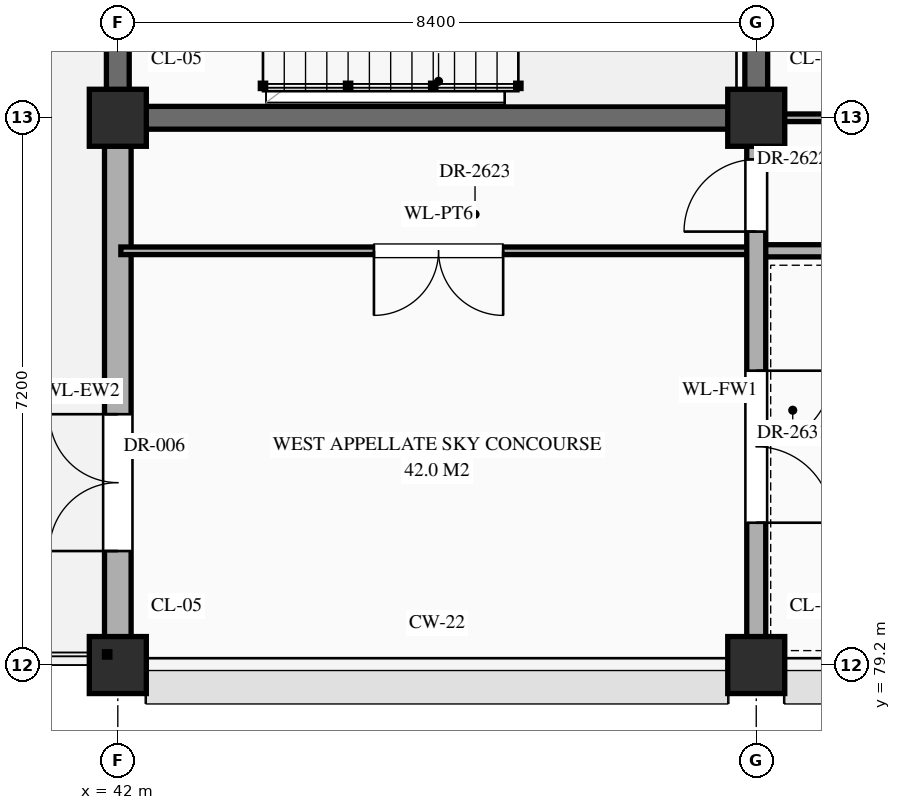
"""IFC4 building model, lengths in metres.
Left out: names, types, materials, properties, quantities, classifications, styles, units other than length and angle.
Written with IfcOpenShell. Run it as: python <this file> out.ifc"""

import sys

from ifc_helpers import new_model, si_unit, direction, frame, frame_2d, origin, origin_2d, place, context, subcontext, project, spatial, rectangle, extrude, element, fill, save


model = new_model("IFC4")
c1 = context("Model", 3, precision=1e-05, world=origin(), true_north=direction((0.0, 1.0)))
c2 = subcontext(c1, "Body", "Model", "MODEL_VIEW")
j1 = project(units=[si_unit("LENGTHUNIT", "METRE"), si_unit("PLANEANGLEUNIT", "RADIAN")], contexts=[c1])
p1 = place(None, origin())
s1 = spatial("IfcSite", under=j1, at=p1, CompositionType="ELEMENT")
p2 = place(p1, origin())
s2 = spatial("IfcBuilding", under=s1, at=p2, CompositionType="ELEMENT")
p3 = place(p2, frame((0.0, 0.0, 35.1)))
s3 = spatial("IfcBuildingStorey", under=s2, at=p3, CompositionType="ELEMENT", Elevation=35.1)
for number, where, z_axis, x_axis in (
    (1, (42.0, 79.2, 0.0), (0.0, 0.0, 1.0), (1.0, 0.0, 0.0)),
    (2, (42.0, 86.4, 0.0), (0.0, 0.0, 1.0), (1.0, 0.0, 0.0)),
    (3, (50.4, 79.2, 0.0), (0.0, 0.0, 1.0), (1.0, 0.0, 0.0)),
    (4, (50.4, 86.4, 0.0), (0.0, 0.0, 1.0), (1.0, 0.0, 0.0)),
):
    element("IfcColumn", number, at=place(p3, frame(where, z_axis=z_axis, x_axis=x_axis)), inside=s3, PredefinedType="COLUMN", context=c2, shape_type="SweptSolid", body=[
        extrude(rectangle(XDim=0.75, YDim=0.75, at=origin_2d()), origin(), (0.0, 0.0, 1.0), 4.2),
    ])
p4 = place(p3, frame((42.0, 79.57, 0.0), z_axis=(0.0, 0.0, 1.0), x_axis=(0.0, 1.0, 0.0)))
e5 = element("IfcWall", 5, at=p4, inside=s3, PredefinedType="STANDARD", context=c2, shape_type="SweptSolid", body=[
    extrude(rectangle(XDim=6.46, YDim=0.35, at=frame_2d((3.23, 0.0))), origin(), (0.0, 0.0, 1.0), 3.3),
])
p5 = place(p4, frame((1.13, 0.0, 0.0)))
e6 = element("IfcOpeningElement", 6, at=p5, cuts=e5, PredefinedType="OPENING", context=c2, shape_type="SweptSolid", body=[
    extrude(rectangle(XDim=1.8, YDim=2.25, at=frame_2d((0.9, 1.125))), frame((0.0, 0.187, 0.0), z_axis=(0.0, -1.0, 0.0), x_axis=(1.0, 0.0, 0.0)), (0.0, 0.0, 1.0), 0.374),
])
p6 = place(p3, frame((42.0, 86.77, 0.0), z_axis=(0.0, 0.0, 1.0), x_axis=(0.0, 1.0, 0.0)))
e7 = element("IfcWall", 7, at=p6, inside=s3, PredefinedType="SHEAR", context=c2, shape_type="SweptSolid", body=[
    extrude(rectangle(XDim=6.46, YDim=0.3, at=frame_2d((3.23, 0.0))), origin(), (0.0, 0.0, 1.0), 3.95),
])
p7 = place(p3, frame((42.04, 84.65, 0.0), z_axis=(0.0, 0.0, 1.0), x_axis=(1.0, 0.0, 0.0)))
e8 = element("IfcWall", 8, at=p7, inside=s3, PredefinedType="STANDARD", context=c2, shape_type="SweptSolid", body=[
    extrude(rectangle(XDim=8.36, YDim=0.1, at=frame_2d((4.18, 0.0))), origin(), (0.0, 0.0, 1.0), 3.95),
])
p8 = place(p7, frame((3.33, 0.0, 0.0)))
e9 = element("IfcOpeningElement", 9, at=p8, cuts=e8, PredefinedType="OPENING", context=c2, shape_type="SweptSolid", body=[
    extrude(rectangle(XDim=1.7, YDim=2.45, at=frame_2d((0.85, 1.225))), frame((0.0, 0.062, 0.0), z_axis=(0.0, -1.0, 0.0), x_axis=(1.0, 0.0, 0.0)), (0.0, 0.0, 1.0), 0.124),
])
p9 = place(p3, frame((50.4, 84.65, 0.0), z_axis=(0.0, 0.0, 1.0), x_axis=(1.0, 0.0, 0.0)))
e10 = element("IfcWall", 10, at=p9, inside=s3, PredefinedType="STANDARD", context=c2, shape_type="SweptSolid", body=[
    extrude(rectangle(XDim=16.8, YDim=0.16, at=frame_2d((8.4, 0.0))), origin(), (0.0, 0.0, 1.0), 3.95),
])
p10 = place(p9, frame((7.45, 0.0, 0.0)))
e11 = element("IfcOpeningElement", 11, at=p10, cuts=e10, PredefinedType="OPENING", context=c2, shape_type="SweptSolid", body=[
    extrude(rectangle(XDim=1.9, YDim=2.5, at=frame_2d((0.95, 1.25))), frame((0.0, 0.092, 0.0), z_axis=(0.0, -1.0, 0.0), x_axis=(1.0, 0.0, 0.0)), (0.0, 0.0, 1.0), 0.184),
])
p11 = place(p3, frame((42.04, 86.4, 0.0), z_axis=(0.0, 0.0, 1.0), x_axis=(1.0, 0.0, 0.0)))
e12 = element("IfcWall", 12, at=p11, inside=s3, PredefinedType="SHEAR", context=c2, shape_type="SweptSolid", body=[
    extrude(rectangle(XDim=8.36, YDim=0.3, at=frame_2d((4.18, 0.0))), origin(), (0.0, 0.0, 1.0), 3.95),
])
p12 = place(p3, frame((50.4, 86.4, 0.0), z_axis=(0.0, 0.0, 1.0), x_axis=(1.0, 0.0, 0.0)))
e13 = element("IfcWall", 13, at=p12, inside=s3, PredefinedType="STANDARD", context=c2, shape_type="SweptSolid", body=[
    extrude(rectangle(XDim=8.4, YDim=0.1, at=frame_2d((4.2, 0.0))), origin(), (0.0, 0.0, 1.0), 3.1),
])
p13 = place(p12, frame((1.028, 0.0, 0.0)))
e14 = element("IfcOpeningElement", 14, at=p13, cuts=e13, PredefinedType="OPENING", context=c2, shape_type="SweptSolid", body=[
    extrude(rectangle(XDim=1.04, YDim=2.2, at=frame_2d((0.52, 1.1))), frame((0.0, 0.062, 0.0), z_axis=(0.0, -1.0, 0.0), x_axis=(1.0, 0.0, 0.0)), (0.0, 0.0, 1.0), 0.124),
])
p14 = place(p12, frame((3.64, 0.0, 0.0)))
e15 = element("IfcOpeningElement", 15, at=p14, cuts=e13, PredefinedType="OPENING", context=c2, shape_type="SweptSolid", body=[
    extrude(rectangle(XDim=1.12, YDim=2.25, at=frame_2d((0.56, 1.125))), frame((0.0, 0.062, 0.0), z_axis=(0.0, -1.0, 0.0), x_axis=(1.0, 0.0, 0.0)), (0.0, 0.0, 1.0), 0.124),
])
p15 = place(p12, frame((6.272, 0.0, 0.0)))
e16 = element("IfcOpeningElement", 16, at=p15, cuts=e13, PredefinedType="OPENING", context=c2, shape_type="SweptSolid", body=[
    extrude(rectangle(XDim=1.16, YDim=2.3, at=frame_2d((0.58, 1.15))), frame((0.0, 0.062, 0.0), z_axis=(0.0, -1.0, 0.0), x_axis=(1.0, 0.0, 0.0)), (0.0, 0.0, 1.0), 0.124),
])
p16 = place(p3, frame((50.4, 79.24, 0.0), z_axis=(0.0, 0.0, 1.0), x_axis=(0.0, 1.0, 0.0)))
e17 = element("IfcWall", 17, at=p16, inside=s3, PredefinedType="STANDARD", context=c2, shape_type="SweptSolid", body=[
    extrude(rectangle(XDim=7.16, YDim=0.25, at=frame_2d((3.58, 0.0))), origin(), (0.0, 0.0, 1.0), 3.2),
])
p17 = place(p16, frame((5.663, 0.0, 0.0)))
e18 = element("IfcOpeningElement", 18, at=p17, cuts=e17, PredefinedType="OPENING", context=c2, shape_type="SweptSolid", body=[
    extrude(rectangle(XDim=0.95, YDim=2.15, at=frame_2d((0.475, 1.075))), frame((0.0, 0.137, 0.0), z_axis=(0.0, -1.0, 0.0), x_axis=(1.0, 0.0, 0.0)), (0.0, 0.0, 1.0), 0.274),
])
p18 = place(p16, frame((1.833, 0.0, 0.0)))
e19 = element("IfcOpeningElement", 19, at=p18, cuts=e17, PredefinedType="OPENING", context=c2, shape_type="SweptSolid", body=[
    extrude(rectangle(XDim=2.0, YDim=2.4, at=frame_2d((1.0, 1.2))), frame((0.0, 0.137, 0.0), z_axis=(0.0, -1.0, 0.0), x_axis=(1.0, 0.0, 0.0)), (0.0, 0.0, 1.0), 0.274),
])
p19 = place(p3, frame((50.4, 86.4, 0.0), z_axis=(0.0, 0.0, 1.0), x_axis=(0.0, 1.0, 0.0)))
e20 = element("IfcWall", 20, at=p19, inside=s3, PredefinedType="SHEAR", context=c2, shape_type="SweptSolid", body=[
    extrude(rectangle(XDim=4.8, YDim=0.3, at=frame_2d((2.4, 0.0))), origin(), (0.0, 0.0, 1.0), 3.95),
])
p20 = place(p5, origin())
e21 = element("IfcDoor", 21, at=p20, inside=s3, OperationType="DOUBLE_DOOR_SINGLE_SWING", PredefinedType="DOOR", context=c2, shape_type="SweptSolid", body=[
    extrude(rectangle(XDim=1.8, YDim=2.25, at=frame_2d((0.9, 1.125))), frame((0.0, 0.025, 0.0), z_axis=(0.0, -1.0, 0.0), x_axis=(1.0, 0.0, 0.0)), (0.0, 0.0, 1.0), 0.05),
])
fill(e6, e21)
p21 = place(p17, origin())
e22 = element("IfcDoor", 22, at=p21, inside=s3, OperationType="SINGLE_SWING_LEFT", PredefinedType="DOOR", context=c2, shape_type="SweptSolid", body=[
    extrude(rectangle(XDim=0.95, YDim=2.15, at=frame_2d((0.475, 1.075))), frame((0.0, 0.025, 0.0), z_axis=(0.0, -1.0, 0.0), x_axis=(1.0, 0.0, 0.0)), (0.0, 0.0, 1.0), 0.05),
])
fill(e18, e22)
p22 = place(p8, frame((1.7, 0.0, 0.0), z_axis=(0.0, 0.0, 1.0), x_axis=(-1.0, 0.0, 0.0)))
e23 = element("IfcDoor", 23, at=p22, inside=s3, OperationType="DOUBLE_DOOR_SINGLE_SWING", PredefinedType="DOOR", context=c2, shape_type="SweptSolid", body=[
    extrude(rectangle(XDim=1.7, YDim=2.45, at=frame_2d((0.85, 1.225))), frame((0.0, 0.025, 0.0), z_axis=(0.0, -1.0, 0.0), x_axis=(1.0, 0.0, 0.0)), (0.0, 0.0, 1.0), 0.05),
])
fill(e9, e23)
p23 = place(p18, frame((2.0, 0.0, 0.0), z_axis=(0.0, 0.0, 1.0), x_axis=(-1.0, 0.0, 0.0)))
e24 = element("IfcDoor", 24, at=p23, inside=s3, OperationType="DOUBLE_DOOR_SINGLE_SWING", PredefinedType="DOOR", context=c2, shape_type="SweptSolid", body=[
    extrude(rectangle(XDim=2.0, YDim=2.4, at=frame_2d((1.0, 1.2))), frame((0.0, 0.025, 0.0), z_axis=(0.0, -1.0, 0.0), x_axis=(1.0, 0.0, 0.0)), (0.0, 0.0, 1.0), 0.05),
])
fill(e19, e24)
save(model, sys.argv[1])
